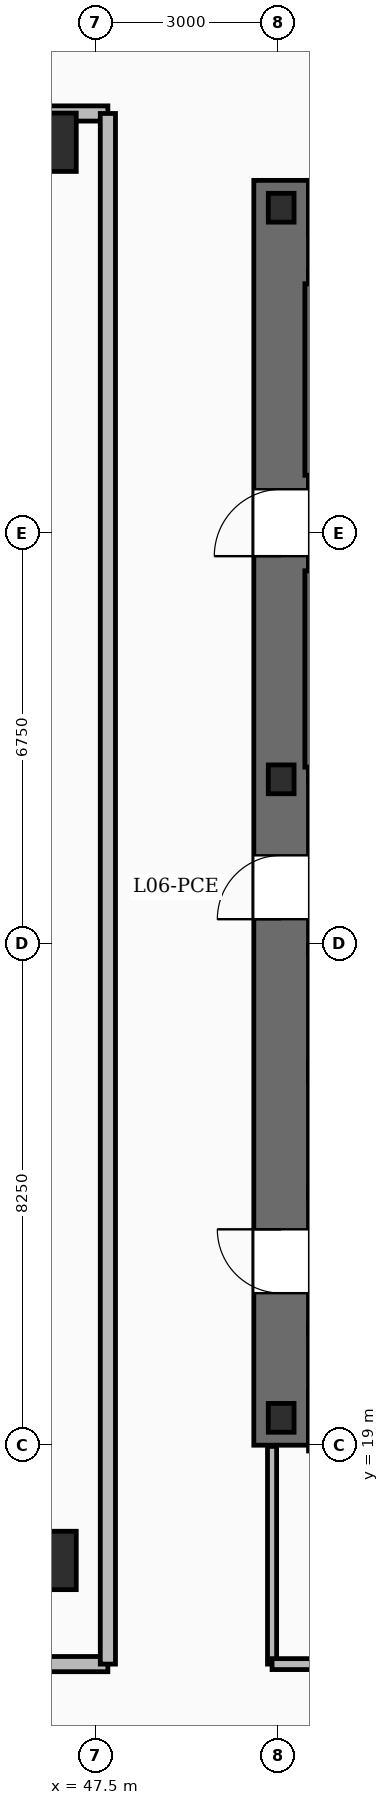
"""IFC4 building model, lengths in metres.
Left out: names, types, materials, properties, quantities, classifications, styles, units other than length and angle.
Written with IfcOpenShell. Run it as: python <this file> out.ifc"""

import sys

from ifc_helpers import new_model, si_unit, direction, frame, frame_2d, origin, origin_2d, place, context, subcontext, project, spatial, rectangle, circle, i_section, extrude, element, fill, save


model = new_model("IFC4")
c1 = context("Model", 3, precision=1e-05, world=origin(), true_north=direction((0.0, 1.0)))
c2 = subcontext(c1, "Body", "Model", "MODEL_VIEW")
j1 = project(units=[si_unit("LENGTHUNIT", "METRE"), si_unit("PLANEANGLEUNIT", "RADIAN")], contexts=[c1])
p1 = place(None, origin())
s1 = spatial("IfcSite", under=j1, at=p1, CompositionType="ELEMENT")
p2 = place(p1, origin())
s2 = spatial("IfcBuilding", under=s1, at=p2, CompositionType="ELEMENT")
p3 = place(p2, frame((0.0, 0.0, 34.0)))
s3 = spatial("IfcBuildingStorey", under=s2, at=p3, CompositionType="ELEMENT", Elevation=34.0)
p4 = place(p3, frame((50.55, 19.0, -0.45), z_axis=(0.0, 0.0, 1.0), x_axis=(0.0, 1.0, 0.0)))
e1 = element("IfcWall", 1, at=p4, inside=s3, PredefinedType="SHEAR", context=c2, shape_type="SweptSolid", body=[
    extrude(rectangle(XDim=20.8, YDim=0.9, at=frame_2d((10.4, 0.0))), origin(), (0.0, 0.0, 1.0), 8.0),
])
p5 = place(p4, frame((2.5, 0.0, 0.45)))
e2 = element("IfcOpeningElement", 2, at=p5, cuts=e1, PredefinedType="OPENING", context=c2, shape_type="SweptSolid", body=[
    extrude(rectangle(XDim=1.05, YDim=2.15, at=frame_2d((0.525, 1.075))), frame((0.0, 0.46, 0.0), z_axis=(0.0, -1.0, 0.0), x_axis=(1.0, 0.0, 0.0)), (0.0, 0.0, 1.0), 0.92),
])
p6 = place(p4, frame((8.65, 0.0, 0.45)))
e3 = element("IfcOpeningElement", 3, at=p6, cuts=e1, PredefinedType="OPENING", context=c2, shape_type="SweptSolid", body=[
    extrude(rectangle(XDim=1.05, YDim=2.15, at=frame_2d((0.525, 1.075))), frame((0.0, 0.46, 0.0), z_axis=(0.0, -1.0, 0.0), x_axis=(1.0, 0.0, 0.0)), (0.0, 0.0, 1.0), 0.92),
])
p7 = place(p4, frame((14.62, 0.0, 0.45)))
e4 = element("IfcOpeningElement", 4, at=p7, cuts=e1, PredefinedType="OPENING", context=c2, shape_type="SweptSolid", body=[
    extrude(rectangle(XDim=1.1, YDim=2.15, at=frame_2d((0.55, 1.075))), frame((0.0, 0.46, 0.0), z_axis=(0.0, -1.0, 0.0), x_axis=(1.0, 0.0, 0.0)), (0.0, 0.0, 1.0), 0.92),
])
for number, where, z_axis, x_axis in (
    (5, (51.0, 19.45, -0.45), (0.0, 0.0, 1.0), (1.0, 0.0, 0.0)),
    (6, (51.0, 39.35, -0.45), (0.0, 0.0, 1.0), (1.0, 0.0, 0.0)),
):
    element("IfcWall", number, at=place(p3, frame(where, z_axis=z_axis, x_axis=x_axis)), inside=s3, PredefinedType="SHEAR", context=c2, shape_type="SweptSolid", body=[
        extrude(rectangle(XDim=8.9, YDim=0.9, at=frame_2d((4.45, 0.0))), origin(), (0.0, 0.0, 1.0), 8.0),
    ])
for number, where, z_axis, x_axis in (
    (7, (50.55, 19.45, -0.45), (0.0, 0.0, 1.0), (1.0, 0.0, 0.0)),
    (8, (50.55, 29.95, -0.45), (0.0, 0.0, 1.0), (1.0, 0.0, 0.0)),
    (9, (50.55, 39.35, -0.45), (0.0, 0.0, 1.0), (1.0, 0.0, 0.0)),
):
    element("IfcColumn", number, at=place(p3, frame(where, z_axis=z_axis, x_axis=x_axis)), inside=s3, PredefinedType="COLUMN", context=c2, shape_type="SweptSolid", body=[
        extrude(i_section(OverallWidth=0.424, OverallDepth=0.474, WebThickness=0.048, FlangeThickness=0.077, FilletRadius=0.02, at=origin_2d()), origin(), (0.0, 0.0, 1.0), 8.0),
    ])
p8 = place(p3, frame((46.7, 17.104, -0.192), z_axis=(-0.32550061671, 0.282763760261, 0.902271580182), x_axis=(-0.655808513487, -0.754927277053, 0.0)))
e10 = element("IfcColumn", 10, at=p8, inside=s3, PredefinedType="COLUMN", context=c2, shape_type="SweptSolid", body=[
    extrude(circle(Radius=0.48, at=origin_2d()), origin(), (0.0, 0.0, 1.0), 8.295),
])
p9 = place(p3, frame((46.7, 40.427, -0.069), z_axis=(-0.266118192043, -0.648222430351, 0.713434502007), x_axis=(0.925077995153, -0.379777175306, 0.0)))
e11 = element("IfcColumn", 11, at=p9, inside=s3, PredefinedType="COLUMN", context=c2, shape_type="SweptSolid", body=[
    extrude(circle(Radius=0.48, at=origin_2d()), origin(), (0.0, 0.0, 1.0), 10.146),
])
p10 = place(p3, frame((59.9, 30.03, 0.0), z_axis=(0.0, 0.0, 1.0), x_axis=(-1.0, 0.0, 0.0)))
e12 = element("IfcWall", 12, at=p10, inside=s3, PredefinedType="SOLIDWALL", context=c2, shape_type="SweptSolid", body=[
    extrude(rectangle(XDim=8.9, YDim=0.24, at=frame_2d((4.45, 0.0))), origin(), (0.0, 0.0, 1.0), 7.55),
])
p11 = place(p10, frame((7.38, 0.0, 0.0)))
e13 = element("IfcOpeningElement", 13, at=p11, cuts=e12, PredefinedType="OPENING", context=c2, shape_type="SweptSolid", body=[
    extrude(rectangle(XDim=1.1, YDim=2.15, at=frame_2d((0.55, 1.075))), frame((0.0, 0.13, 0.0), z_axis=(0.0, -1.0, 0.0), x_axis=(1.0, 0.0, 0.0)), (0.0, 0.0, 1.0), 0.26),
])
p12 = place(p3, frame((51.0, 33.5, 0.0), z_axis=(0.0, 0.0, 1.0), x_axis=(1.0, 0.0, 0.0)))
e14 = element("IfcWall", 14, at=p12, inside=s3, PredefinedType="SOLIDWALL", context=c2, shape_type="SweptSolid", body=[
    extrude(rectangle(XDim=8.9, YDim=0.24, at=frame_2d((4.45, 0.0))), origin(), (0.0, 0.0, 1.0), 7.55),
])
p13 = place(p3, frame((51.06, 30.15, 0.0), z_axis=(0.0, 0.0, 1.0), x_axis=(0.0, 1.0, 0.0)))
e15 = element("IfcWall", 15, at=p13, inside=s3, PredefinedType="SOLIDWALL", context=c2, shape_type="SweptSolid", body=[
    extrude(rectangle(XDim=3.23, YDim=0.24, at=frame_2d((1.615, 0.0))), origin(), (0.0, 0.0, 1.0), 7.55),
])
p14 = place(p3, frame((59.9, 34.83, 0.0), z_axis=(0.0, 0.0, 1.0), x_axis=(-1.0, 0.0, 0.0)))
e16 = element("IfcWall", 16, at=p14, inside=s3, PredefinedType="SOLIDWALL", context=c2, shape_type="SweptSolid", body=[
    extrude(rectangle(XDim=8.9, YDim=0.24, at=frame_2d((4.45, 0.0))), origin(), (0.0, 0.0, 1.0), 7.55),
])
p15 = place(p14, frame((7.42, 0.0, 0.0)))
e17 = element("IfcOpeningElement", 17, at=p15, cuts=e16, PredefinedType="OPENING", context=c2, shape_type="SweptSolid", body=[
    extrude(rectangle(XDim=1.1, YDim=2.15, at=frame_2d((0.55, 1.075))), frame((0.0, 0.13, 0.0), z_axis=(0.0, -1.0, 0.0), x_axis=(1.0, 0.0, 0.0)), (0.0, 0.0, 1.0), 0.26),
])
p16 = place(p3, frame((51.0, 38.22, 0.0), z_axis=(0.0, 0.0, 1.0), x_axis=(1.0, 0.0, 0.0)))
e18 = element("IfcWall", 18, at=p16, inside=s3, PredefinedType="SOLIDWALL", context=c2, shape_type="SweptSolid", body=[
    extrude(rectangle(XDim=8.9, YDim=0.24, at=frame_2d((4.45, 0.0))), origin(), (0.0, 0.0, 1.0), 7.55),
])
p17 = place(p3, frame((51.06, 34.95, 0.0), z_axis=(0.0, 0.0, 1.0), x_axis=(0.0, 1.0, 0.0)))
e19 = element("IfcWall", 19, at=p17, inside=s3, PredefinedType="SOLIDWALL", context=c2, shape_type="SweptSolid", body=[
    extrude(rectangle(XDim=3.15, YDim=0.24, at=frame_2d((1.575, 0.0))), origin(), (0.0, 0.0, 1.0), 7.55),
])
for number, where, z_axis, x_axis in (
    (20, (51.0, 20.905, 0.0), (0.0, 0.0, 1.0), (1.0, 0.0, 0.0)),
    (21, (51.0, 18.995, 0.0), (0.0, 0.0, 1.0), (1.0, 0.0, 0.0)),
):
    element("IfcWall", number, at=place(p3, frame(where, z_axis=z_axis, x_axis=x_axis)), inside=s3, PredefinedType="SOLIDWALL", context=c2, shape_type="SweptSolid", body=[
        extrude(rectangle(XDim=2.79, YDim=0.18, at=frame_2d((1.395, 0.0))), origin(), (0.0, 0.0, 1.0), 7.55),
    ])
for number, where, z_axis, x_axis in (
    (22, (51.0, 25.055, 0.0), (0.0, 0.0, 1.0), (1.0, 0.0, 0.0)),
    (23, (51.0, 23.145, 0.0), (0.0, 0.0, 1.0), (1.0, 0.0, 0.0)),
):
    element("IfcWall", number, at=place(p3, frame(where, z_axis=z_axis, x_axis=x_axis)), inside=s3, PredefinedType="SOLIDWALL", context=c2, shape_type="SweptSolid", body=[
        extrude(rectangle(XDim=2.778, YDim=0.18, at=frame_2d((1.389, 0.0))), origin(), (0.0, 0.0, 1.0), 7.55),
    ])
p18 = place(p3, frame((51.0, 27.155, 0.0), z_axis=(0.0, 0.0, 1.0), x_axis=(1.0, 0.0, 0.0)))
e24 = element("IfcWall", 24, at=p18, inside=s3, PredefinedType="SOLIDWALL", context=c2, shape_type="SweptSolid", body=[
    extrude(rectangle(XDim=2.865, YDim=0.18, at=frame_2d((1.433, 0.0))), origin(), (0.0, 0.0, 1.0), 7.55),
])
p19 = place(p18, frame((0.785, 0.0, 0.0)))
e25 = element("IfcOpeningElement", 25, at=p19, cuts=e24, PredefinedType="OPENING", context=c2, shape_type="SweptSolid", body=[
    extrude(rectangle(XDim=1.35, YDim=2.3, at=frame_2d((0.675, 1.15))), frame((0.0, 0.1, 0.0), z_axis=(0.0, -1.0, 0.0), x_axis=(1.0, 0.0, 0.0)), (0.0, 0.0, 1.0), 0.2),
])
p20 = place(p3, frame((51.0, 25.245, 0.0), z_axis=(0.0, 0.0, 1.0), x_axis=(1.0, 0.0, 0.0)))
e26 = element("IfcWall", 26, at=p20, inside=s3, PredefinedType="SOLIDWALL", context=c2, shape_type="SweptSolid", body=[
    extrude(rectangle(XDim=2.865, YDim=0.18, at=frame_2d((1.433, 0.0))), origin(), (0.0, 0.0, 1.0), 7.55),
])
p21 = place(p3, frame((50.4, 15.4, 0.0), z_axis=(0.0, 0.0, 1.0), x_axis=(1.0, 0.0, 0.0)))
e27 = element("IfcWall", 27, at=p21, inside=s3, PredefinedType="SOLIDWALL", context=c2, shape_type="SweptSolid", body=[
    extrude(rectangle(XDim=10.0, YDim=0.18, at=frame_2d((5.0, 0.0))), origin(), (0.0, 0.0, 1.0), 6.61),
])
p22 = place(p21, frame((1.19, 0.0, 0.0)))
e28 = element("IfcOpeningElement", 28, at=p22, cuts=e27, PredefinedType="OPENING", context=c2, shape_type="SweptSolid", body=[
    extrude(rectangle(XDim=0.92, YDim=2.1, at=frame_2d((0.46, 1.05))), frame((0.0, 0.1, 0.0), z_axis=(0.0, -1.0, 0.0), x_axis=(1.0, 0.0, 0.0)), (0.0, 0.0, 1.0), 0.2),
])
p23 = place(p21, frame((4.54, 0.0, 0.0)))
e29 = element("IfcOpeningElement", 29, at=p23, cuts=e27, PredefinedType="OPENING", context=c2, shape_type="SweptSolid", body=[
    extrude(rectangle(XDim=0.92, YDim=2.1, at=frame_2d((0.46, 1.05))), frame((0.0, 0.1, 0.0), z_axis=(0.0, -1.0, 0.0), x_axis=(1.0, 0.0, 0.0)), (0.0, 0.0, 1.0), 0.2),
])
p24 = place(p21, frame((7.92, 0.0, 0.0)))
e30 = element("IfcOpeningElement", 30, at=p24, cuts=e27, PredefinedType="OPENING", context=c2, shape_type="SweptSolid", body=[
    extrude(rectangle(XDim=0.86, YDim=2.05, at=frame_2d((0.43, 1.025))), frame((0.0, 0.1, 0.0), z_axis=(0.0, -1.0, 0.0), x_axis=(1.0, 0.0, 0.0)), (0.0, 0.0, 1.0), 0.2),
])
p25 = place(p3, frame((50.4, 15.4, 0.0), z_axis=(0.0, 0.0, 1.0), x_axis=(0.0, 1.0, 0.0)))
e31 = element("IfcWall", 31, at=p25, inside=s3, PredefinedType="PARTITIONING", context=c2, shape_type="SweptSolid", body=[
    extrude(rectangle(XDim=3.58, YDim=0.15, at=frame_2d((1.79, 0.0))), origin(), (0.0, 0.0, 1.0), 5.6),
])
for number, where, z_axis, x_axis in (
    (32, (27.2, 15.4, 0.0), (0.0, 0.0, 1.0), (1.0, 0.0, 0.0)),
    (33, (27.2, 40.9, 0.0), (0.0, 0.0, 1.0), (1.0, 0.0, 0.0)),
):
    element("IfcWall", number, at=place(p3, frame(where, z_axis=z_axis, x_axis=x_axis)), inside=s3, PredefinedType="SOLIDWALL", context=c2, shape_type="SweptSolid", body=[
        extrude(rectangle(XDim=20.5, YDim=0.25, at=frame_2d((10.25, 0.0))), origin(), (0.0, 0.0, 1.0), 6.61),
    ])
p26 = place(p3, frame((47.7, 15.4, 0.0), z_axis=(0.0, 0.0, 1.0), x_axis=(0.0, 1.0, 0.0)))
e34 = element("IfcWall", 34, at=p26, inside=s3, PredefinedType="SOLIDWALL", context=c2, shape_type="SweptSolid", body=[
    extrude(rectangle(XDim=25.5, YDim=0.25, at=frame_2d((12.75, 0.0))), origin(), (0.0, 0.0, 1.0), 6.61),
])
p27 = place(p5, origin())
e35 = element("IfcDoor", 35, at=p27, inside=s3, OperationType="SINGLE_SWING_RIGHT", PredefinedType="DOOR", context=c2, shape_type="SweptSolid", body=[
    extrude(rectangle(XDim=1.05, YDim=2.15, at=frame_2d((0.525, 1.075))), frame((0.0, 0.025, 0.0), z_axis=(0.0, -1.0, 0.0), x_axis=(1.0, 0.0, 0.0)), (0.0, 0.0, 1.0), 0.05),
])
fill(e2, e35)
p28 = place(p6, origin())
e36 = element("IfcDoor", 36, at=p28, inside=s3, OperationType="SINGLE_SWING_LEFT", PredefinedType="DOOR", context=c2, shape_type="SweptSolid", body=[
    extrude(rectangle(XDim=1.05, YDim=2.15, at=frame_2d((0.525, 1.075))), frame((0.0, 0.025, 0.0), z_axis=(0.0, -1.0, 0.0), x_axis=(1.0, 0.0, 0.0)), (0.0, 0.0, 1.0), 0.05),
])
fill(e3, e36)
p29 = place(p7, origin())
e37 = element("IfcDoor", 37, at=p29, inside=s3, OperationType="SINGLE_SWING_LEFT", PredefinedType="DOOR", context=c2, shape_type="SweptSolid", body=[
    extrude(rectangle(XDim=1.1, YDim=2.15, at=frame_2d((0.55, 1.075))), frame((0.0, 0.025, 0.0), z_axis=(0.0, -1.0, 0.0), x_axis=(1.0, 0.0, 0.0)), (0.0, 0.0, 1.0), 0.05),
])
fill(e4, e37)
save(model, sys.argv[1])
